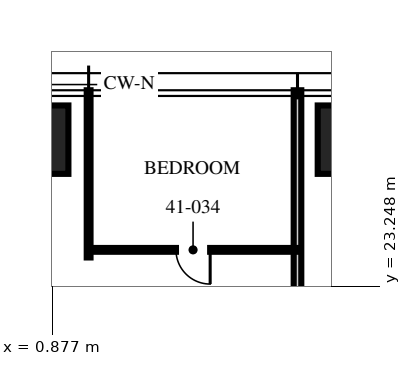
"""IFC4 building model, lengths in metres.
Left out: names, types, materials, properties, quantities, classifications, styles, units other than length and angle.
Written with IfcOpenShell. Run it as: python <this file> out.ifc"""

import sys

from ifc_helpers import new_model, si_unit, direction, frame, frame_2d, origin, origin_2d, place, context, subcontext, project, spatial, rectangle, extrude, element, fill, save


model = new_model("IFC4")
c1 = context("Model", 3, precision=1e-05, world=origin(), true_north=direction((0.0, 1.0)))
c2 = subcontext(c1, "Body", "Model", "MODEL_VIEW")
j1 = project(units=[si_unit("LENGTHUNIT", "METRE"), si_unit("PLANEANGLEUNIT", "RADIAN")], contexts=[c1])
p1 = place(None, origin())
s1 = spatial("IfcSite", under=j1, at=p1, CompositionType="ELEMENT")
p2 = place(p1, origin())
s2 = spatial("IfcBuilding", under=s1, at=p2, CompositionType="ELEMENT")
p3 = place(p2, frame((0.0, 0.0, 163.5)))
s3 = spatial("IfcBuildingStorey", under=s2, at=p3, CompositionType="ELEMENT", Elevation=163.5)
for number, where, z_axis, x_axis in (
    (1, (0.0, 27.1, 0.0), (0.0, 0.0, 1.0), (1.0, 0.0, 0.0)),
    (2, (9.16, 27.1, 0.0), (0.0, 0.0, 1.0), (1.0, 0.0, 0.0)),
):
    element("IfcColumn", number, at=place(p3, frame(where, z_axis=z_axis, x_axis=x_axis)), inside=s3, PredefinedType="COLUMN", context=c2, shape_type="SweptSolid", body=[
        extrude(rectangle(XDim=2.6, YDim=1.8, at=origin_2d()), origin(), (0.0, 0.0, 1.0), 3.75),
    ])
p4 = place(p3, frame((7.328, 16.5, 0.0), z_axis=(0.0, 0.0, 1.0), x_axis=(0.0, 1.0, 0.0)))
e3 = element("IfcWall", 3, at=p4, inside=s3, PredefinedType="PARTITIONING", context=c2, shape_type="SweptSolid", body=[
    extrude(rectangle(XDim=11.9, YDim=0.2, at=frame_2d((5.95, 0.0))), origin(), (0.0, 0.0, 1.0), 2.81),
])
p5 = place(p3, frame((1.832, 24.0, 0.0), z_axis=(0.0, 0.0, 1.0), x_axis=(0.0, 1.0, 0.0)))
e4 = element("IfcWall", 4, at=p5, inside=s3, PredefinedType="PARTITIONING", context=c2, shape_type="SweptSolid", body=[
    extrude(rectangle(XDim=4.4, YDim=0.1, at=frame_2d((2.2, 0.0))), origin(), (0.0, 0.0, 1.0), 2.81),
])
p6 = place(p3, frame((7.328, 24.2, 0.0), z_axis=(0.0, 0.0, 1.0), x_axis=(-1.0, 0.0, 0.0)))
e5 = element("IfcWall", 5, at=p6, inside=s3, PredefinedType="PARTITIONING", context=c2, shape_type="SweptSolid", body=[
    extrude(rectangle(XDim=5.496, YDim=0.1, at=frame_2d((2.748, 0.0))), origin(), (0.0, 0.0, 1.0), 2.81),
])
p7 = place(p6, frame((2.298, 0.0, 0.0)))
e6 = element("IfcOpeningElement", 6, at=p7, cuts=e5, PredefinedType="OPENING", context=c2, shape_type="SweptSolid", body=[
    extrude(rectangle(XDim=0.9, YDim=2.1, at=frame_2d((0.45, 1.05))), frame((0.0, 0.06, 0.0), z_axis=(0.0, -1.0, 0.0), x_axis=(1.0, 0.0, 0.0)), (0.0, 0.0, 1.0), 0.12),
])
p8 = place(p7, origin())
e7 = element("IfcDoor", 7, at=p8, inside=s3, OperationType="SINGLE_SWING_LEFT", PredefinedType="DOOR", context=c2, shape_type="SweptSolid", body=[
    extrude(rectangle(XDim=0.9, YDim=2.1, at=frame_2d((0.45, 1.05))), frame((0.0, 0.025, 0.0), z_axis=(0.0, -1.0, 0.0), x_axis=(1.0, 0.0, 0.0)), (0.0, 0.0, 1.0), 0.05),
])
fill(e6, e7)
save(model, sys.argv[1])
